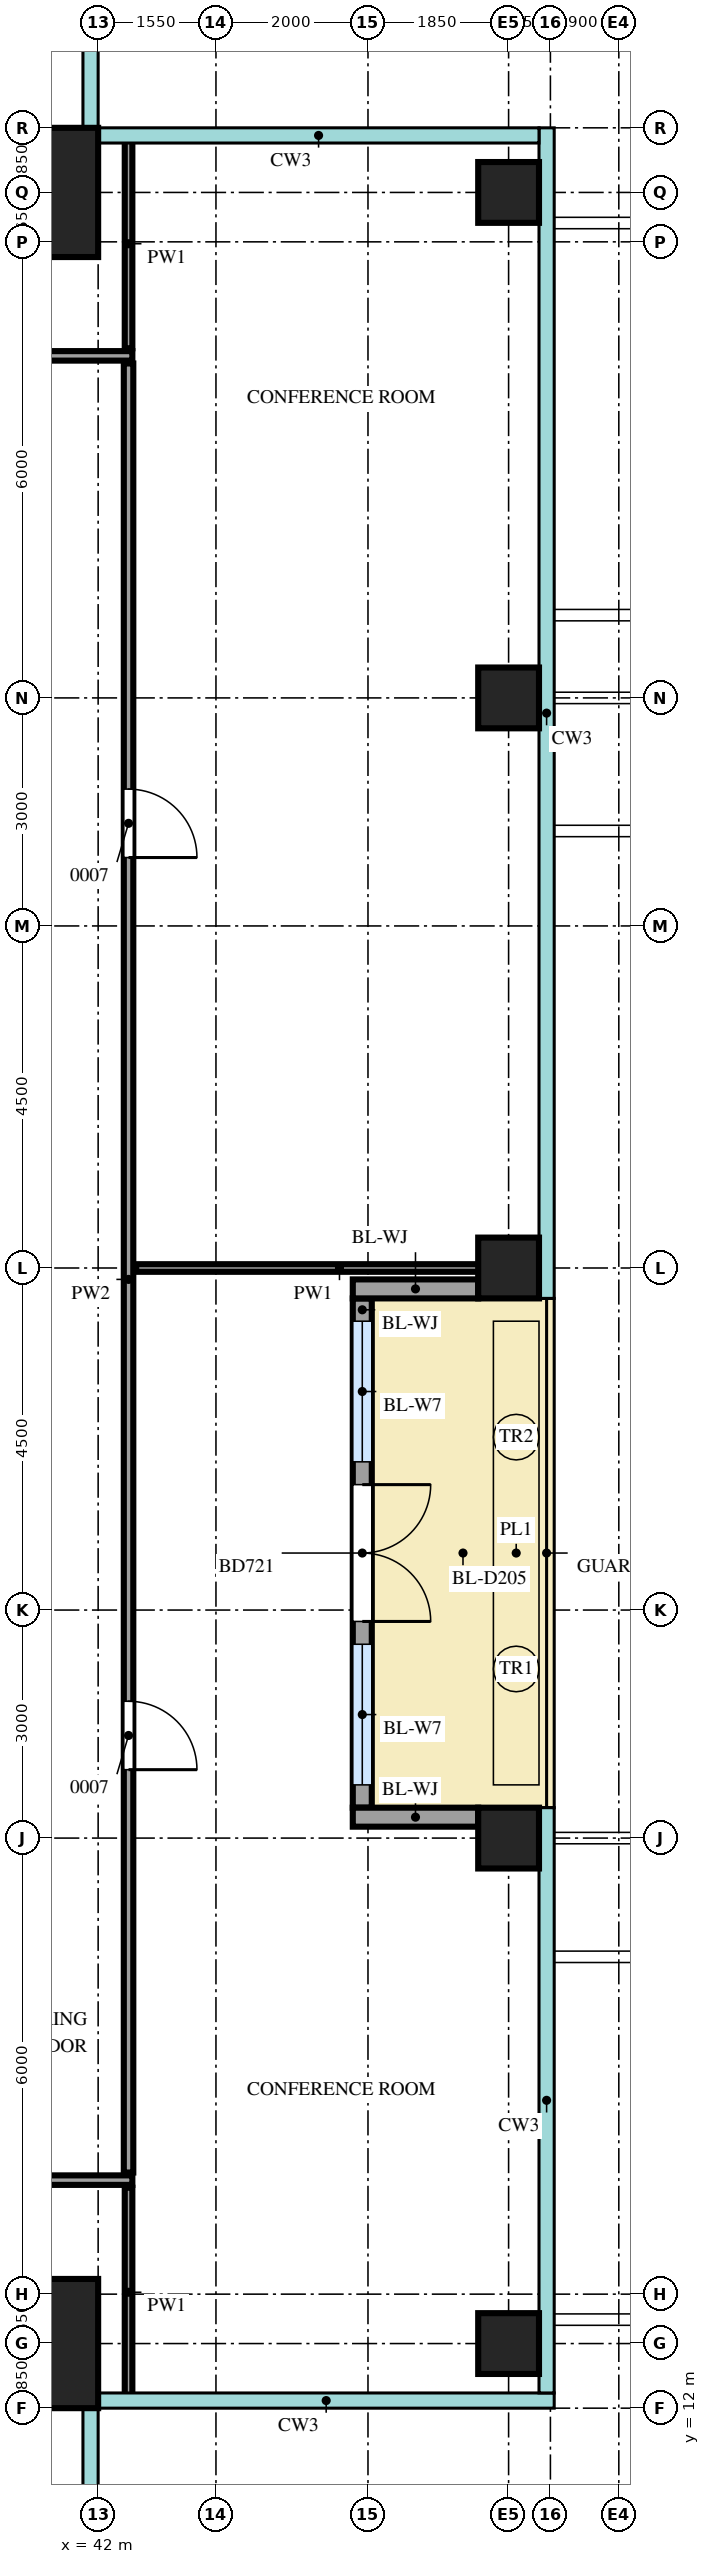
"""IFC4 building model, lengths in metres.
Left out: names, types, materials, properties, quantities, classifications, styles, units other than length and angle.
Written with IfcOpenShell. Run it as: python <this file> out.ifc"""

import sys

from ifc_helpers import new_model, si_unit, direction, frame, frame_2d, origin, origin_2d, place, context, subcontext, project, spatial, rectangle, extrude, source, transform, mapped, element, fill, save


model = new_model("IFC4")
c1 = context("Model", 3, precision=1e-05, world=origin(), true_north=direction((0.0, 1.0)))
c2 = subcontext(c1, "Body", "Model", "MODEL_VIEW")
j1 = project(units=[si_unit("LENGTHUNIT", "METRE"), si_unit("PLANEANGLEUNIT", "RADIAN")], contexts=[c1])
p1 = place(None, origin())
s1 = spatial("IfcSite", under=j1, at=p1, CompositionType="ELEMENT")
p2 = place(p1, origin())
s2 = spatial("IfcBuilding", under=s1, at=p2, CompositionType="ELEMENT")
p3 = place(p2, frame((0.0, 0.0, 318.2)))
s3 = spatial("IfcBuildingStorey", under=s2, at=p3, CompositionType="ELEMENT", Elevation=318.2)
m1 = source(origin(), c2, "Body", "SweptSolid", [
    extrude(rectangle(XDim=1.7, YDim=1.7, at=origin_2d()), origin(), (0.0, 0.0, 1.0), 3.75),
])
for number, where, z_axis, x_axis in (
    (1, (41.15, 41.15, 0.0), (0.0, 0.0, 1.0), (1.0, 0.0, 0.0)),
    (2, (41.15, 12.85, 0.0), (0.0, 0.0, 1.0), (1.0, 0.0, 0.0)),
):
    element("IfcColumn", number, at=place(p3, frame(where, z_axis=z_axis, x_axis=x_axis)), inside=s3, PredefinedType="COLUMN", context=c2, shape_type="MappedRepresentation", body=[
        mapped(m1, transform((0.0, 0.0, 0.0))),
    ])
m2 = source(origin(), c2, "Body", "SweptSolid", [
    extrude(rectangle(XDim=0.8, YDim=0.8, at=origin_2d()), origin(), (0.0, 0.0, 1.0), 3.75),
])
for number, where, z_axis, x_axis in (
    (3, (47.4, 12.85, 0.0), (0.0, 0.0, 1.0), (1.0, 0.0, 0.0)),
    (4, (47.4, 19.5, 0.0), (0.0, 0.0, 1.0), (1.0, 0.0, 0.0)),
    (5, (47.4, 27.0, 0.0), (0.0, 0.0, 1.0), (1.0, 0.0, 0.0)),
    (6, (47.4, 34.5, 0.0), (0.0, 0.0, 1.0), (1.0, 0.0, 0.0)),
    (7, (47.4, 41.15, 0.0), (0.0, 0.0, 1.0), (1.0, 0.0, 0.0)),
):
    element("IfcColumn", number, at=place(p3, frame(where, z_axis=z_axis, x_axis=x_axis)), inside=s3, PredefinedType="COLUMN", context=c2, shape_type="MappedRepresentation", body=[
        mapped(m2, transform((0.0, 0.0, 0.0))),
    ])
m3 = source(origin(), c2, "Body", "SweptSolid", [
    extrude(rectangle(XDim=6.7, YDim=0.25, at=frame_2d((3.35, 0.0))), origin(), (0.0, 0.0, 1.0), 3.2),
])
p4 = place(p3, frame((45.475, 19.9, 0.0), z_axis=(0.0, 0.0, 1.0), x_axis=(0.0, 1.0, 0.0)))
e8 = element("IfcWall", 8, at=p4, inside=s3, PredefinedType="SOLIDWALL", context=c2, shape_type="MappedRepresentation", body=[
    mapped(m3, transform((0.0, 0.0, 0.0))),
])
m4 = source(origin(), c2, "Body", "SweptSolid", [
    extrude(rectangle(XDim=1.85, YDim=2.4, at=frame_2d((0.925, 1.2))), frame((0.0, 0.135, 0.0), z_axis=(0.0, -1.0, 0.0), x_axis=(1.0, 0.0, 0.0)), (0.0, 0.0, 1.0), 0.27),
])
p5 = place(p4, frame((0.3, 0.0, 0.0)))
e9 = element("IfcOpeningElement", 9, at=p5, cuts=e8, PredefinedType="OPENING", context=c2, shape_type="MappedRepresentation", body=[
    mapped(m4, transform((0.0, 0.0, 0.0))),
])
p6 = place(p4, frame((4.55, 0.0, 0.0)))
e10 = element("IfcOpeningElement", 10, at=p6, cuts=e8, PredefinedType="OPENING", context=c2, shape_type="MappedRepresentation", body=[
    mapped(m4, transform((0.0, 0.0, 0.0))),
])
m5 = source(origin(), c2, "Body", "SweptSolid", [
    extrude(rectangle(XDim=1.8, YDim=2.4, at=frame_2d((0.9, 1.2))), frame((0.0, 0.135, 0.0), z_axis=(0.0, -1.0, 0.0), x_axis=(1.0, 0.0, 0.0)), (0.0, 0.0, 1.0), 0.27),
])
p7 = place(p4, frame((2.45, 0.0, 0.0)))
e11 = element("IfcOpeningElement", 11, at=p7, cuts=e8, PredefinedType="OPENING", context=c2, shape_type="MappedRepresentation", body=[
    mapped(m5, transform((0.0, 0.0, 0.0))),
])
m6 = source(origin(), c2, "Body", "SweptSolid", [
    extrude(rectangle(XDim=1.65, YDim=0.25, at=frame_2d((0.825, 0.0))), origin(), (0.0, 0.0, 1.0), 3.2),
])
for number, where, z_axis, x_axis in (
    (12, (47.0, 19.775, 0.0), (0.0, 0.0, 1.0), (-1.0, 0.0, 0.0)),
    (13, (47.0, 26.725, 0.0), (0.0, 0.0, 1.0), (-1.0, 0.0, 0.0)),
):
    element("IfcWall", number, at=place(p3, frame(where, z_axis=z_axis, x_axis=x_axis)), inside=s3, PredefinedType="SOLIDWALL", context=c2, shape_type="MappedRepresentation", body=[
        mapped(m6, transform((0.0, 0.0, 0.0))),
    ])
m7 = source(origin(), c2, "Body", "SweptSolid", [
    extrude(rectangle(XDim=2.75, YDim=0.1, at=frame_2d((1.375, 0.0))), origin(), (0.0, 0.0, 1.0), 3.8),
])
p8 = place(p3, frame((42.4, 12.15, 0.0), z_axis=(0.0, 0.0, 1.0), x_axis=(0.0, 1.0, 0.0)))
e14 = element("IfcWall", 14, at=p8, inside=s3, PredefinedType="PARTITIONING", context=c2, shape_type="MappedRepresentation", body=[
    mapped(m7, transform((0.0, 0.0, 0.0))),
])
m8 = source(origin(), c2, "Body", "SweptSolid", [
    extrude(rectangle(XDim=19.1, YDim=0.125, at=frame_2d((9.55, 0.0))), origin(), (0.0, 0.0, 1.0), 3.8),
])
p9 = place(p3, frame((23.35, 15.0, 0.0), z_axis=(0.0, 0.0, 1.0), x_axis=(1.0, 0.0, 0.0)))
e15 = element("IfcWall", 15, at=p9, inside=s3, PredefinedType="PARTITIONING", context=c2, shape_type="MappedRepresentation", body=[
    mapped(m8, transform((0.0, 0.0, 0.0))),
])
m9 = source(origin(), c2, "Body", "SweptSolid", [
    extrude(rectangle(XDim=0.9, YDim=2.1, at=frame_2d((0.45, 1.05))), frame((0.0, 0.073, 0.0), z_axis=(0.0, -1.0, 0.0), x_axis=(1.0, 0.0, 0.0)), (0.0, 0.0, 1.0), 0.145),
])
p10 = place(p9, frame((5.3, 0.0, 0.0)))
e16 = element("IfcOpeningElement", 16, at=p10, cuts=e15, PredefinedType="OPENING", context=c2, shape_type="MappedRepresentation", body=[
    mapped(m9, transform((0.0, 0.0, 0.0))),
])
p11 = place(p9, frame((13.3, 0.0, 0.0)))
e17 = element("IfcOpeningElement", 17, at=p11, cuts=e15, PredefinedType="OPENING", context=c2, shape_type="MappedRepresentation", body=[
    mapped(m9, transform((0.0, 0.0, 0.0))),
])
m10 = source(origin(), c2, "Body", "SweptSolid", [
    extrude(rectangle(XDim=23.8, YDim=0.125, at=frame_2d((11.9, 0.0))), origin(), (0.0, 0.0, 1.0), 3.8),
])
p12 = place(p3, frame((42.4, 15.1, 0.0), z_axis=(0.0, 0.0, 1.0), x_axis=(0.0, 1.0, 0.0)))
e18 = element("IfcWall", 18, at=p12, inside=s3, PredefinedType="PARTITIONING", context=c2, shape_type="MappedRepresentation", body=[
    mapped(m10, transform((0.0, 0.0, 0.0))),
])
p13 = place(p12, frame((5.3, 0.0, 0.0)))
e19 = element("IfcOpeningElement", 19, at=p13, cuts=e18, PredefinedType="OPENING", context=c2, shape_type="MappedRepresentation", body=[
    mapped(m9, transform((0.0, 0.0, 0.0))),
])
p14 = place(p12, frame((17.3, 0.0, 0.0)))
e20 = element("IfcOpeningElement", 20, at=p14, cuts=e18, PredefinedType="OPENING", context=c2, shape_type="MappedRepresentation", body=[
    mapped(m9, transform((0.0, 0.0, 0.0))),
])
m11 = source(origin(), c2, "Body", "SweptSolid", [
    extrude(rectangle(XDim=5.35, YDim=0.1, at=frame_2d((2.675, 0.0))), origin(), (0.0, 0.0, 1.0), 3.8),
])
p15 = place(p3, frame((42.5, 27.0, 0.0), z_axis=(0.0, 0.0, 1.0), x_axis=(1.0, 0.0, 0.0)))
e21 = element("IfcWall", 21, at=p15, inside=s3, PredefinedType="PARTITIONING", context=c2, shape_type="MappedRepresentation", body=[
    mapped(m11, transform((0.0, 0.0, 0.0))),
])
m12 = source(origin(), c2, "Body", "SweptSolid", [
    extrude(rectangle(XDim=12.1, YDim=0.125, at=frame_2d((6.05, 0.0))), origin(), (0.0, 0.0, 1.0), 3.8),
])
p16 = place(p3, frame((30.35, 39.0, 0.0), z_axis=(0.0, 0.0, 1.0), x_axis=(1.0, 0.0, 0.0)))
e22 = element("IfcWall", 22, at=p16, inside=s3, PredefinedType="PARTITIONING", context=c2, shape_type="MappedRepresentation", body=[
    mapped(m12, transform((0.0, 0.0, 0.0))),
])
m13 = source(origin(), c2, "Body", "SweptSolid", [
    extrude(rectangle(XDim=1.2, YDim=2.1, at=frame_2d((0.6, 1.05))), frame((0.0, 0.073, 0.0), z_axis=(0.0, -1.0, 0.0), x_axis=(1.0, 0.0, 0.0)), (0.0, 0.0, 1.0), 0.145),
])
p17 = place(p16, frame((5.25, 0.0, 0.0)))
e23 = element("IfcOpeningElement", 23, at=p17, cuts=e22, PredefinedType="OPENING", context=c2, shape_type="MappedRepresentation", body=[
    mapped(m13, transform((0.0, 0.0, 0.0))),
])
p18 = place(p3, frame((42.4, 39.1, 0.0), z_axis=(0.0, 0.0, 1.0), x_axis=(0.0, 1.0, 0.0)))
e24 = element("IfcWall", 24, at=p18, inside=s3, PredefinedType="PARTITIONING", context=c2, shape_type="MappedRepresentation", body=[
    mapped(m7, transform((0.0, 0.0, 0.0))),
])
m14 = source(origin(), c2, "Body", "SweptSolid", [
    extrude(rectangle(XDim=1.85, YDim=2.4, at=frame_2d((0.925, 1.2))), frame((0.0, 0.03, 0.0), z_axis=(0.0, -1.0, 0.0), x_axis=(1.0, 0.0, 0.0)), (0.0, 0.0, 1.0), 0.06),
])
p19 = place(p5, origin())
e25 = element("IfcWindow", 25, at=p19, inside=s3, PartitioningType="SINGLE_PANEL", PredefinedType="WINDOW", context=c2, shape_type="MappedRepresentation", body=[
    mapped(m14, transform((0.0, 0.0, 0.0))),
])
fill(e9, e25)
p20 = place(p6, origin())
e26 = element("IfcWindow", 26, at=p20, inside=s3, PartitioningType="SINGLE_PANEL", PredefinedType="WINDOW", context=c2, shape_type="MappedRepresentation", body=[
    mapped(m14, transform((0.0, 0.0, 0.0))),
])
fill(e10, e26)
m15 = source(origin(), c2, "Body", "SweptSolid", [
    extrude(rectangle(XDim=1.8, YDim=2.4, at=frame_2d((0.9, 1.2))), frame((0.0, 0.025, 0.0), z_axis=(0.0, -1.0, 0.0), x_axis=(1.0, 0.0, 0.0)), (0.0, 0.0, 1.0), 0.05),
])
p21 = place(p7, origin())
e27 = element("IfcDoor", 27, at=p21, inside=s3, OperationType="DOUBLE_DOOR_DOUBLE_SWING", PredefinedType="DOOR", context=c2, shape_type="MappedRepresentation", body=[
    mapped(m15, transform((0.0, 0.0, 0.0))),
])
fill(e11, e27)
m16 = source(origin(), c2, "Body", "SweptSolid", [
    extrude(rectangle(XDim=0.9, YDim=2.1, at=frame_2d((0.45, 1.05))), frame((0.0, 0.025, 0.0), z_axis=(0.0, -1.0, 0.0), x_axis=(1.0, 0.0, 0.0)), (0.0, 0.0, 1.0), 0.05),
])
p22 = place(p13, origin())
e28 = element("IfcDoor", 28, at=p22, inside=s3, OperationType="SINGLE_SWING_LEFT", PredefinedType="DOOR", context=c2, shape_type="MappedRepresentation", body=[
    mapped(m16, transform((0.0, 0.0, 0.0))),
])
fill(e19, e28)
p23 = place(p14, origin())
e29 = element("IfcDoor", 29, at=p23, inside=s3, OperationType="SINGLE_SWING_LEFT", PredefinedType="DOOR", context=c2, shape_type="MappedRepresentation", body=[
    mapped(m16, transform((0.0, 0.0, 0.0))),
])
fill(e20, e29)
save(model, sys.argv[1])
